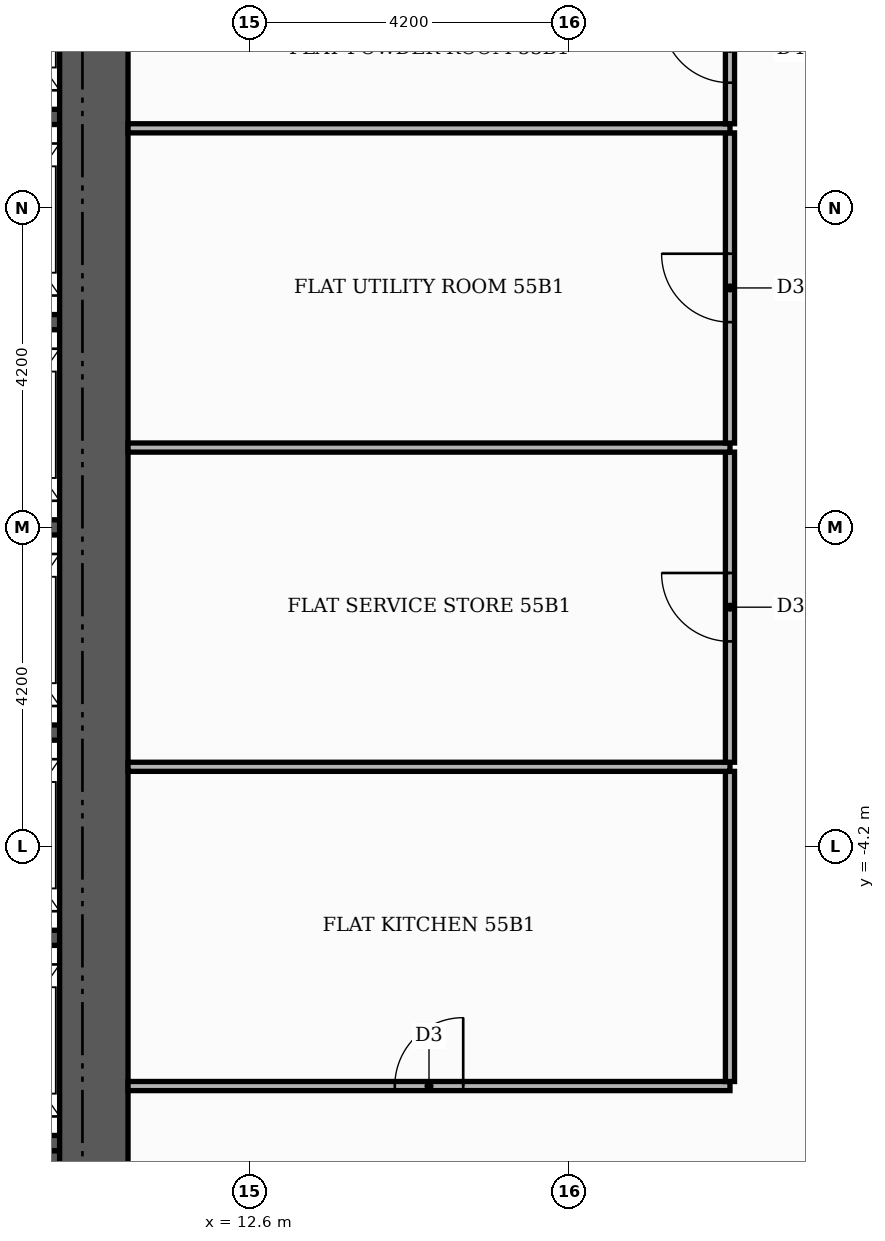
"""IFC4 building model, lengths in metres.
Left out: names, types, materials, properties, quantities, classifications, styles, units other than length and angle.
Written with IfcOpenShell. Run it as: python <this file> out.ifc"""

import sys

from ifc_helpers import new_model, si_unit, direction, frame, frame_2d, origin, place, context, subcontext, project, spatial, rectangle, extrude, element, fill, save


model = new_model("IFC4")
c1 = context("Model", 3, precision=1e-05, world=origin(), true_north=direction((0.0, 1.0)))
c2 = subcontext(c1, "Body", "Model", "MODEL_VIEW")
j1 = project(units=[si_unit("LENGTHUNIT", "METRE"), si_unit("PLANEANGLEUNIT", "RADIAN")], contexts=[c1])
p1 = place(None, origin())
s1 = spatial("IfcSite", under=j1, at=p1, CompositionType="ELEMENT")
p2 = place(p1, origin())
s2 = spatial("IfcBuilding", under=s1, at=p2, CompositionType="ELEMENT")
p3 = place(p2, frame((0.0, 0.0, 231.3)))
s3 = spatial("IfcBuildingStorey", under=s2, at=p3, CompositionType="ELEMENT", Elevation=231.3)
p4 = place(p3, frame((5.5, -9.15, 0.0), z_axis=(0.0, 0.0, 1.0), x_axis=(1.0, 0.0, 0.0)))
e1 = element("IfcWall", 1, at=p4, inside=s3, PredefinedType="SHEAR", context=c2, shape_type="SweptSolid", body=[
    extrude(rectangle(XDim=4.6, YDim=1.9, at=frame_2d((2.3, 0.0))), origin(), (0.0, 0.0, 1.0), 3.4),
])
for number, where, z_axis, x_axis in (
    (2, (8.1, -8.1, 0.0), (0.0, 0.0, 1.0), (1.0, 0.0, 0.0)),
    (3, (8.1, -5.4, 0.0), (0.0, 0.0, 1.0), (1.0, 0.0, 0.0)),
    (4, (8.1, -2.7, 0.0), (0.0, 0.0, 1.0), (1.0, 0.0, 0.0)),
    (5, (8.1, 0.0, 0.0), (0.0, 0.0, 1.0), (1.0, 0.0, 0.0)),
    (6, (8.1, 2.7, 0.0), (0.0, 0.0, 1.0), (1.0, 0.0, 0.0)),
    (7, (8.1, 5.4, 0.0), (0.0, 0.0, 1.0), (1.0, 0.0, 0.0)),
):
    element("IfcWall", number, at=place(p3, frame(where, z_axis=z_axis, x_axis=x_axis)), inside=s3, PredefinedType="SHEAR", context=c2, shape_type="SweptSolid", body=[
        extrude(rectangle(XDim=2.0, YDim=0.2, at=frame_2d((1.0, 0.0))), origin(), (0.0, 0.0, 1.0), 3.4),
    ])
p5 = place(p3, frame((10.55, -10.1, 0.0), z_axis=(0.0, 0.0, 1.0), x_axis=(0.0, 1.0, 0.0)))
e8 = element("IfcWall", 8, at=p5, inside=s3, PredefinedType="SHEAR", context=c2, shape_type="SweptSolid", body=[
    extrude(rectangle(XDim=20.2, YDim=0.9, at=frame_2d((10.1, 0.0))), origin(), (0.0, 0.0, 1.0), 3.4),
])
p6 = place(p3, frame((11.0, -7.35, 0.0), z_axis=(0.0, 0.0, 1.0), x_axis=(1.0, 0.0, 0.0)))
e9 = element("IfcWall", 9, at=p6, inside=s3, PredefinedType="PARTITIONING", context=c2, shape_type="SweptSolid", body=[
    extrude(rectangle(XDim=7.92, YDim=0.12, at=frame_2d((3.96, 0.0))), origin(), (0.0, 0.0, 1.0), 3.4),
])
p7 = place(p6, frame((3.51, 0.0, 0.0)))
e10 = element("IfcOpeningElement", 10, at=p7, cuts=e9, PredefinedType="OPENING", context=c2, shape_type="SweptSolid", body=[
    extrude(rectangle(XDim=0.9, YDim=2.1, at=frame_2d((0.45, 1.05))), frame((0.0, 0.07, 0.0), z_axis=(0.0, -1.0, 0.0), x_axis=(1.0, 0.0, 0.0)), (0.0, 0.0, 1.0), 0.14),
])
p8 = place(p3, frame((18.92, -7.29, 0.0), z_axis=(0.0, 0.0, 1.0), x_axis=(0.0, 1.0, 0.0)))
e11 = element("IfcWall", 11, at=p8, inside=s3, PredefinedType="PARTITIONING", context=c2, shape_type="SweptSolid", body=[
    extrude(rectangle(XDim=4.08, YDim=0.12, at=frame_2d((2.04, 0.0))), origin(), (0.0, 0.0, 1.0), 3.4),
])
p9 = place(p3, frame((11.0, -3.15, 0.0), z_axis=(0.0, 0.0, 1.0), x_axis=(1.0, 0.0, 0.0)))
e12 = element("IfcWall", 12, at=p9, inside=s3, PredefinedType="PARTITIONING", context=c2, shape_type="SweptSolid", body=[
    extrude(rectangle(XDim=7.92, YDim=0.12, at=frame_2d((3.96, 0.0))), origin(), (0.0, 0.0, 1.0), 3.4),
])
p10 = place(p3, frame((18.92, -3.09, 0.0), z_axis=(0.0, 0.0, 1.0), x_axis=(0.0, 1.0, 0.0)))
e13 = element("IfcWall", 13, at=p10, inside=s3, PredefinedType="PARTITIONING", context=c2, shape_type="SweptSolid", body=[
    extrude(rectangle(XDim=4.08, YDim=0.12, at=frame_2d((2.04, 0.0))), origin(), (0.0, 0.0, 1.0), 3.4),
])
p11 = place(p10, frame((1.59, 0.0, 0.0)))
e14 = element("IfcOpeningElement", 14, at=p11, cuts=e13, PredefinedType="OPENING", context=c2, shape_type="SweptSolid", body=[
    extrude(rectangle(XDim=0.9, YDim=2.1, at=frame_2d((0.45, 1.05))), frame((0.0, 0.07, 0.0), z_axis=(0.0, -1.0, 0.0), x_axis=(1.0, 0.0, 0.0)), (0.0, 0.0, 1.0), 0.14),
])
p12 = place(p3, frame((11.0, 1.05, 0.0), z_axis=(0.0, 0.0, 1.0), x_axis=(1.0, 0.0, 0.0)))
e15 = element("IfcWall", 15, at=p12, inside=s3, PredefinedType="PARTITIONING", context=c2, shape_type="SweptSolid", body=[
    extrude(rectangle(XDim=7.92, YDim=0.12, at=frame_2d((3.96, 0.0))), origin(), (0.0, 0.0, 1.0), 3.4),
])
p13 = place(p3, frame((18.92, 1.11, 0.0), z_axis=(0.0, 0.0, 1.0), x_axis=(0.0, 1.0, 0.0)))
e16 = element("IfcWall", 16, at=p13, inside=s3, PredefinedType="PARTITIONING", context=c2, shape_type="SweptSolid", body=[
    extrude(rectangle(XDim=4.08, YDim=0.12, at=frame_2d((2.04, 0.0))), origin(), (0.0, 0.0, 1.0), 3.4),
])
p14 = place(p13, frame((1.59, 0.0, 0.0)))
e17 = element("IfcOpeningElement", 17, at=p14, cuts=e16, PredefinedType="OPENING", context=c2, shape_type="SweptSolid", body=[
    extrude(rectangle(XDim=0.9, YDim=2.1, at=frame_2d((0.45, 1.05))), frame((0.0, 0.07, 0.0), z_axis=(0.0, -1.0, 0.0), x_axis=(1.0, 0.0, 0.0)), (0.0, 0.0, 1.0), 0.14),
])
p15 = place(p3, frame((11.0, 5.25, 0.0), z_axis=(0.0, 0.0, 1.0), x_axis=(1.0, 0.0, 0.0)))
e18 = element("IfcWall", 18, at=p15, inside=s3, PredefinedType="PARTITIONING", context=c2, shape_type="SweptSolid", body=[
    extrude(rectangle(XDim=7.92, YDim=0.12, at=frame_2d((3.96, 0.0))), origin(), (0.0, 0.0, 1.0), 3.4),
])
p16 = place(p3, frame((18.92, 5.31, 0.0), z_axis=(0.0, 0.0, 1.0), x_axis=(0.0, 1.0, 0.0)))
e19 = element("IfcWall", 19, at=p16, inside=s3, PredefinedType="PARTITIONING", context=c2, shape_type="SweptSolid", body=[
    extrude(rectangle(XDim=1.98, YDim=0.12, at=frame_2d((0.99, 0.0))), origin(), (0.0, 0.0, 1.0), 3.4),
])
p17 = place(p16, frame((0.54, 0.0, 0.0)))
e20 = element("IfcOpeningElement", 20, at=p17, cuts=e19, PredefinedType="OPENING", context=c2, shape_type="SweptSolid", body=[
    extrude(rectangle(XDim=0.9, YDim=2.1, at=frame_2d((0.45, 1.05))), frame((0.0, 0.07, 0.0), z_axis=(0.0, -1.0, 0.0), x_axis=(1.0, 0.0, 0.0)), (0.0, 0.0, 1.0), 0.14),
])
p18 = place(p7, origin())
e21 = element("IfcDoor", 21, at=p18, inside=s3, OperationType="SINGLE_SWING_RIGHT", PredefinedType="DOOR", context=c2, shape_type="SweptSolid", body=[
    extrude(rectangle(XDim=0.9, YDim=2.1, at=frame_2d((0.45, 1.05))), frame((0.0, 0.025, 0.0), z_axis=(0.0, -1.0, 0.0), x_axis=(1.0, 0.0, 0.0)), (0.0, 0.0, 1.0), 0.05),
])
fill(e10, e21)
p19 = place(p11, origin())
e22 = element("IfcDoor", 22, at=p19, inside=s3, OperationType="SINGLE_SWING_RIGHT", PredefinedType="DOOR", context=c2, shape_type="SweptSolid", body=[
    extrude(rectangle(XDim=0.9, YDim=2.1, at=frame_2d((0.45, 1.05))), frame((0.0, 0.025, 0.0), z_axis=(0.0, -1.0, 0.0), x_axis=(1.0, 0.0, 0.0)), (0.0, 0.0, 1.0), 0.05),
])
fill(e14, e22)
p20 = place(p14, origin())
e23 = element("IfcDoor", 23, at=p20, inside=s3, OperationType="SINGLE_SWING_RIGHT", PredefinedType="DOOR", context=c2, shape_type="SweptSolid", body=[
    extrude(rectangle(XDim=0.9, YDim=2.1, at=frame_2d((0.45, 1.05))), frame((0.0, 0.025, 0.0), z_axis=(0.0, -1.0, 0.0), x_axis=(1.0, 0.0, 0.0)), (0.0, 0.0, 1.0), 0.05),
])
fill(e17, e23)
p21 = place(p17, origin())
e24 = element("IfcDoor", 24, at=p21, inside=s3, OperationType="SINGLE_SWING_RIGHT", PredefinedType="DOOR", context=c2, shape_type="SweptSolid", body=[
    extrude(rectangle(XDim=0.9, YDim=2.1, at=frame_2d((0.45, 1.05))), frame((0.0, 0.025, 0.0), z_axis=(0.0, -1.0, 0.0), x_axis=(1.0, 0.0, 0.0)), (0.0, 0.0, 1.0), 0.05),
])
fill(e20, e24)
save(model, sys.argv[1])
